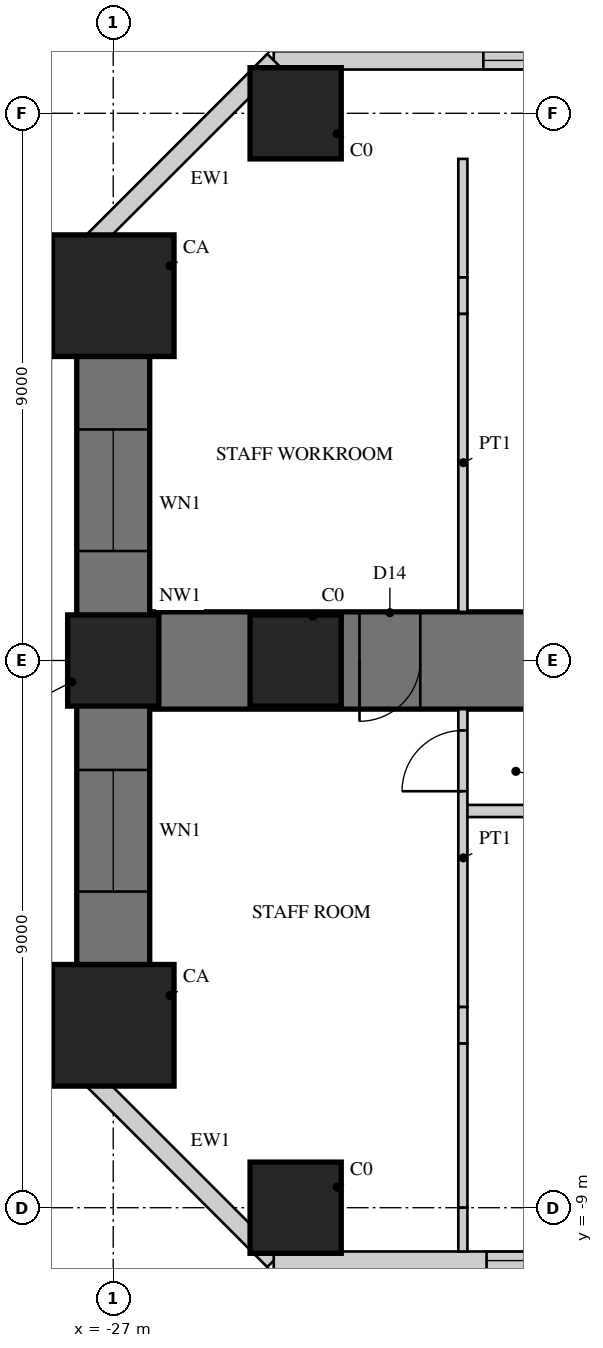
"""IFC4 building model, lengths in metres.
Left out: names, types, materials, properties, quantities, classifications, styles, units other than length and angle.
Written with IfcOpenShell. Run it as: python <this file> out.ifc"""

import sys

from ifc_helpers import new_model, si_unit, direction, frame, frame_2d, origin, origin_2d, place, context, subcontext, project, spatial, rectangle, hollow_rectangle, extrude, element, fill, save


model = new_model("IFC4")
c1 = context("Model", 3, precision=1e-05, world=origin(), true_north=direction((0.0, 1.0)))
c2 = subcontext(c1, "Body", "Model", "MODEL_VIEW")
j1 = project(units=[si_unit("LENGTHUNIT", "METRE"), si_unit("PLANEANGLEUNIT", "RADIAN")], contexts=[c1])
p1 = place(None, origin())
s1 = spatial("IfcSite", under=j1, at=p1, CompositionType="ELEMENT")
p2 = place(p1, origin())
s2 = spatial("IfcBuilding", under=s1, at=p2, CompositionType="ELEMENT")
p3 = place(p2, frame((0.0, 0.0, 5.0)))
s3 = spatial("IfcBuildingStorey", under=s2, at=p3, CompositionType="ELEMENT", Elevation=5.0)
p4 = place(p3, frame((-9.0, 0.0, 0.0), z_axis=(0.0, 0.0, 1.0), x_axis=(-1.0, 0.0, 0.0)))
e1 = element("IfcWall", 1, at=p4, inside=s3, PredefinedType="SHEAR", context=c2, shape_type="SweptSolid", body=[
    extrude(rectangle(XDim=18.0, YDim=1.6, at=frame_2d((9.0, 0.0))), origin(), (0.0, 0.0, 1.0), 4.5),
])
p5 = place(p4, frame((1.85, 0.0, 0.0)))
e2 = element("IfcOpeningElement", 2, at=p5, cuts=e1, PredefinedType="OPENING", context=c2, shape_type="SweptSolid", body=[
    extrude(rectangle(XDim=1.0, YDim=2.2, at=frame_2d((0.5, 1.1))), frame((0.0, 0.81, 0.0), z_axis=(0.0, -1.0, 0.0), x_axis=(1.0, 0.0, 0.0)), (0.0, 0.0, 1.0), 1.62),
])
p6 = place(p4, frame((7.2, 0.0, 0.0)))
e3 = element("IfcOpeningElement", 3, at=p6, cuts=e1, PredefinedType="OPENING", context=c2, shape_type="SweptSolid", body=[
    extrude(rectangle(XDim=1.0, YDim=2.2, at=frame_2d((0.5, 1.1))), frame((0.0, 0.81, 0.0), z_axis=(0.0, -1.0, 0.0), x_axis=(1.0, 0.0, 0.0)), (0.0, 0.0, 1.0), 1.62),
])
p7 = place(p4, frame((12.95, 0.0, 0.0)))
e4 = element("IfcOpeningElement", 4, at=p7, cuts=e1, PredefinedType="OPENING", context=c2, shape_type="SweptSolid", body=[
    extrude(rectangle(XDim=1.0, YDim=2.2, at=frame_2d((0.5, 1.1))), frame((0.0, 0.81, 0.0), z_axis=(0.0, -1.0, 0.0), x_axis=(1.0, 0.0, 0.0)), (0.0, 0.0, 1.0), 1.62),
])
p8 = place(p3, frame((-27.0, 6.0, 0.0), z_axis=(0.0, 0.0, 1.0), x_axis=(0.0, -1.0, 0.0)))
e5 = element("IfcWall", 5, at=p8, inside=s3, PredefinedType="SHEAR", context=c2, shape_type="SweptSolid", body=[
    extrude(rectangle(XDim=12.0, YDim=1.2, at=frame_2d((6.0, 0.0))), origin(), (0.0, 0.0, 1.0), 4.5),
])
p9 = place(p8, frame((2.2, 0.0, 0.9)))
e6 = element("IfcOpeningElement", 6, at=p9, cuts=e5, PredefinedType="OPENING", context=c2, shape_type="SweptSolid", body=[
    extrude(rectangle(XDim=2.0, YDim=1.8, at=frame_2d((1.0, 0.9))), frame((0.0, 0.61, 0.0), z_axis=(0.0, -1.0, 0.0), x_axis=(1.0, 0.0, 0.0)), (0.0, 0.0, 1.0), 1.22),
])
p10 = place(p8, frame((7.8, 0.0, 0.9)))
e7 = element("IfcOpeningElement", 7, at=p10, cuts=e5, PredefinedType="OPENING", context=c2, shape_type="SweptSolid", body=[
    extrude(rectangle(XDim=2.0, YDim=1.8, at=frame_2d((1.0, 0.9))), frame((0.0, 0.61, 0.0), z_axis=(0.0, -1.0, 0.0), x_axis=(1.0, 0.0, 0.0)), (0.0, 0.0, 1.0), 1.22),
])
for number, where, z_axis, x_axis in (
    (8, (-24.0, 9.0, 0.0), (0.0, 0.0, 1.0), (1.0, 0.0, 0.0)),
    (9, (-24.0, -9.0, 0.0), (0.0, 0.0, 1.0), (1.0, 0.0, 0.0)),
):
    element("IfcColumn", number, at=place(p3, frame(where, z_axis=z_axis, x_axis=x_axis)), inside=s3, PredefinedType="COLUMN", context=c2, shape_type="SweptSolid", body=[
        extrude(rectangle(XDim=1.5, YDim=1.5, at=origin_2d()), origin(), (0.0, 0.0, 1.0), 4.5),
    ])
p11 = place(p3, frame((-27.0, 6.0, 0.0), z_axis=(0.0, 0.0, 1.0), x_axis=(1.0, 0.0, 0.0)))
e10 = element("IfcColumn", 10, at=p11, inside=s3, PredefinedType="COLUMN", context=c2, shape_type="SweptSolid", body=[
    extrude(rectangle(XDim=2.0, YDim=2.0, at=origin_2d()), origin(), (0.0, 0.0, 1.0), 4.5),
])
p12 = place(p3, frame((-27.0, 0.0, 0.0), z_axis=(0.0, 0.0, 1.0), x_axis=(1.0, 0.0, 0.0)))
e11 = element("IfcColumn", 11, at=p12, inside=s3, PredefinedType="COLUMN", context=c2, shape_type="SweptSolid", body=[
    extrude(rectangle(XDim=1.5, YDim=1.5, at=origin_2d()), origin(), (0.0, 0.0, 1.0), 4.5),
])
p13 = place(p3, frame((-27.0, -6.0, 0.0), z_axis=(0.0, 0.0, 1.0), x_axis=(1.0, 0.0, 0.0)))
e12 = element("IfcColumn", 12, at=p13, inside=s3, PredefinedType="COLUMN", context=c2, shape_type="SweptSolid", body=[
    extrude(rectangle(XDim=2.0, YDim=2.0, at=origin_2d()), origin(), (0.0, 0.0, 1.0), 4.5),
])
p14 = place(p3, frame((-24.0, 0.0, 0.0), z_axis=(0.0, 0.0, 1.0), x_axis=(1.0, 0.0, 0.0)))
e13 = element("IfcColumn", 13, at=p14, inside=s3, PredefinedType="COLUMN", context=c2, shape_type="SweptSolid", body=[
    extrude(rectangle(XDim=1.5, YDim=1.5, at=origin_2d()), origin(), (0.0, 0.0, 1.0), 4.5),
])
p15 = place(p3, frame((-9.87, 9.87, 0.0), z_axis=(0.0, 0.0, 1.0), x_axis=(-1.0, 0.0, 0.0)))
e14 = element("IfcWall", 14, at=p15, inside=s3, PredefinedType="SOLIDWALL", context=c2, shape_type="SweptSolid", body=[
    extrude(rectangle(XDim=14.49, YDim=0.3, at=frame_2d((7.245, 0.0))), origin(), (0.0, 0.0, 1.0), 4.3),
])
p16 = place(p15, frame((2.65, 0.0, 0.0)))
e15 = element("IfcOpeningElement", 15, at=p16, cuts=e14, PredefinedType="OPENING", context=c2, shape_type="SweptSolid", body=[
    extrude(rectangle(XDim=1.0, YDim=2.4, at=frame_2d((0.5, 1.2))), frame((0.0, 0.16, 0.0), z_axis=(0.0, -1.0, 0.0), x_axis=(1.0, 0.0, 0.0)), (0.0, 0.0, 1.0), 0.32),
])
p17 = place(p15, frame((0.549, 0.0, 0.6)))
e16 = element("IfcOpeningElement", 16, at=p17, cuts=e14, PredefinedType="OPENING", context=c2, shape_type="SweptSolid", body=[
    extrude(rectangle(XDim=1.8, YDim=2.1, at=frame_2d((0.9, 1.05))), frame((0.0, 0.16, 0.0), z_axis=(0.0, -1.0, 0.0), x_axis=(1.0, 0.0, 0.0)), (0.0, 0.0, 1.0), 0.32),
])
p18 = place(p15, frame((9.243, 0.0, 0.6)))
e17 = element("IfcOpeningElement", 17, at=p18, cuts=e14, PredefinedType="OPENING", context=c2, shape_type="SweptSolid", body=[
    extrude(rectangle(XDim=1.8, YDim=2.1, at=frame_2d((0.9, 1.05))), frame((0.0, 0.16, 0.0), z_axis=(0.0, -1.0, 0.0), x_axis=(1.0, 0.0, 0.0)), (0.0, 0.0, 1.0), 0.32),
])
for number, where, z_axis, x_axis in (
    (18, (-24.36, 9.87, 0.0), (0.0, 0.0, 1.0), (-0.707, -0.707, 0.0)),
    (19, (-27.6, -6.63, 0.0), (0.0, 0.0, 1.0), (0.707, -0.707, 0.0)),
):
    element("IfcWall", number, at=place(p3, frame(where, z_axis=z_axis, x_axis=x_axis)), inside=s3, PredefinedType="SOLIDWALL", context=c2, shape_type="SweptSolid", body=[
        extrude(rectangle(XDim=4.582, YDim=0.3, at=frame_2d((2.291, 0.0))), origin(), (0.0, 0.0, 1.0), 4.3),
    ])
p19 = place(p3, frame((-24.36, -9.87, 0.0), z_axis=(0.0, 0.0, 1.0), x_axis=(1.0, 0.0, 0.0)))
e20 = element("IfcWall", 20, at=p19, inside=s3, PredefinedType="SOLIDWALL", context=c2, shape_type="SweptSolid", body=[
    extrude(rectangle(XDim=6.0, YDim=0.3, at=frame_2d((3.0, 0.0))), origin(), (0.0, 0.0, 1.0), 4.3),
])
p20 = place(p19, frame((3.5, 0.0, 0.9)))
e21 = element("IfcOpeningElement", 21, at=p20, cuts=e20, PredefinedType="OPENING", context=c2, shape_type="SweptSolid", body=[
    extrude(rectangle(XDim=2.0, YDim=1.8, at=frame_2d((1.0, 0.9))), frame((0.0, 0.16, 0.0), z_axis=(0.0, -1.0, 0.0), x_axis=(1.0, 0.0, 0.0)), (0.0, 0.0, 1.0), 0.32),
])
p21 = place(p3, frame((-9.65, -2.475, 0.0), z_axis=(0.0, 0.0, 1.0), x_axis=(-1.0, 0.0, 0.0)))
e22 = element("IfcWall", 22, at=p21, inside=s3, PredefinedType="SOLIDWALL", context=c2, shape_type="SweptSolid", body=[
    extrude(rectangle(XDim=11.6, YDim=0.2, at=frame_2d((5.8, 0.0))), origin(), (0.0, 0.0, 1.0), 4.3),
])
p22 = place(p21, frame((1.2, 0.0, 0.0)))
e23 = element("IfcOpeningElement", 23, at=p22, cuts=e22, PredefinedType="OPENING", context=c2, shape_type="SweptSolid", body=[
    extrude(rectangle(XDim=1.0, YDim=2.2, at=frame_2d((0.5, 1.1))), frame((0.0, 0.11, 0.0), z_axis=(0.0, -1.0, 0.0), x_axis=(1.0, 0.0, 0.0)), (0.0, 0.0, 1.0), 0.22),
])
p23 = place(p21, frame((6.55, 0.0, 0.0)))
e24 = element("IfcOpeningElement", 24, at=p23, cuts=e22, PredefinedType="OPENING", context=c2, shape_type="SweptSolid", body=[
    extrude(rectangle(XDim=1.0, YDim=2.2, at=frame_2d((0.5, 1.1))), frame((0.0, 0.11, 0.0), z_axis=(0.0, -1.0, 0.0), x_axis=(1.0, 0.0, 0.0)), (0.0, 0.0, 1.0), 0.22),
])
p24 = place(p3, frame((-21.25, 8.25, 0.0), z_axis=(0.0, 0.0, 1.0), x_axis=(0.0, -1.0, 0.0)))
e25 = element("IfcWall", 25, at=p24, inside=s3, PredefinedType="PARTITIONING", context=c2, shape_type="SweptSolid", body=[
    extrude(rectangle(XDim=1.95, YDim=0.15, at=frame_2d((0.975, 0.0))), origin(), (0.0, 0.0, 1.0), 3.35),
])
p25 = place(p3, frame((-21.25, 6.3, 0.0), z_axis=(0.0, 0.0, 1.0), x_axis=(0.0, -1.0, 0.0)))
e26 = element("IfcWall", 26, at=p25, inside=s3, PredefinedType="PARTITIONING", context=c2, shape_type="SweptSolid", body=[
    extrude(rectangle(XDim=0.6, YDim=0.15, at=frame_2d((0.3, 0.0))), origin(), (0.0, 0.0, 1.0), 4.3),
])
p26 = place(p3, frame((-21.25, 5.7, 0.0), z_axis=(0.0, 0.0, 1.0), x_axis=(0.0, -1.0, 0.0)))
e27 = element("IfcWall", 27, at=p26, inside=s3, PredefinedType="PARTITIONING", context=c2, shape_type="SweptSolid", body=[
    extrude(rectangle(XDim=4.9, YDim=0.15, at=frame_2d((2.45, 0.0))), origin(), (0.0, 0.0, 1.0), 3.35),
])
p27 = place(p3, frame((-21.25, -0.8, 0.0), z_axis=(0.0, 0.0, 1.0), x_axis=(0.0, -1.0, 0.0)))
e28 = element("IfcWall", 28, at=p27, inside=s3, PredefinedType="PARTITIONING", context=c2, shape_type="SweptSolid", body=[
    extrude(rectangle(XDim=4.9, YDim=0.15, at=frame_2d((2.45, 0.0))), origin(), (0.0, 0.0, 1.0), 3.35),
])
p28 = place(p27, frame((0.35, 0.0, 0.0)))
e29 = element("IfcOpeningElement", 29, at=p28, cuts=e28, PredefinedType="OPENING", context=c2, shape_type="SweptSolid", body=[
    extrude(rectangle(XDim=1.0, YDim=2.2, at=frame_2d((0.5, 1.1))), frame((0.0, 0.085, 0.0), z_axis=(0.0, -1.0, 0.0), x_axis=(1.0, 0.0, 0.0)), (0.0, 0.0, 1.0), 0.17),
])
p29 = place(p3, frame((-21.25, -5.7, 0.0), z_axis=(0.0, 0.0, 1.0), x_axis=(0.0, -1.0, 0.0)))
e30 = element("IfcWall", 30, at=p29, inside=s3, PredefinedType="PARTITIONING", context=c2, shape_type="SweptSolid", body=[
    extrude(rectangle(XDim=0.6, YDim=0.15, at=frame_2d((0.3, 0.0))), origin(), (0.0, 0.0, 1.0), 4.3),
])
p30 = place(p3, frame((-21.25, -6.3, 0.0), z_axis=(0.0, 0.0, 1.0), x_axis=(0.0, -1.0, 0.0)))
e31 = element("IfcWall", 31, at=p30, inside=s3, PredefinedType="PARTITIONING", context=c2, shape_type="SweptSolid", body=[
    extrude(rectangle(XDim=2.7, YDim=0.15, at=frame_2d((1.35, 0.0))), origin(), (0.0, 0.0, 1.0), 3.35),
])
p31 = place(p3, frame((-21.25, -9.0, 0.0), z_axis=(0.0, 0.0, 1.0), x_axis=(0.0, -1.0, 0.0)))
e32 = element("IfcWall", 32, at=p31, inside=s3, PredefinedType="PARTITIONING", context=c2, shape_type="SweptSolid", body=[
    extrude(rectangle(XDim=0.72, YDim=0.15, at=frame_2d((0.36, 0.0))), origin(), (0.0, 0.0, 1.0), 4.3),
])
p32 = place(p18, origin())
e33 = element("IfcWindow", 33, at=p32, inside=s3, PartitioningType="SINGLE_PANEL", PredefinedType="WINDOW", context=c2, shape_type="SweptSolid", body=[
    extrude(hollow_rectangle(XDim=1.8, YDim=2.1, WallThickness=0.06, at=frame_2d((0.9, 1.05))), frame((0.0, 0.03, 0.0), z_axis=(0.0, -1.0, 0.0), x_axis=(1.0, 0.0, 0.0)), (0.0, 0.0, 1.0), 0.06),
    extrude(rectangle(XDim=1.679, YDim=1.979, at=frame_2d((0.9, 1.05))), frame((0.0, 0.03, 0.0), z_axis=(0.0, -1.0, 0.0), x_axis=(1.0, 0.0, 0.0)), (0.0, 0.0, 1.0), 0.06),
])
fill(e17, e33)
p33 = place(p9, origin())
e34 = element("IfcWindow", 34, at=p33, inside=s3, PartitioningType="SINGLE_PANEL", PredefinedType="WINDOW", context=c2, shape_type="SweptSolid", body=[
    extrude(hollow_rectangle(XDim=2.0, YDim=1.8, WallThickness=0.06, at=frame_2d((1.0, 0.9))), frame((0.0, 0.03, 0.0), z_axis=(0.0, -1.0, 0.0), x_axis=(1.0, 0.0, 0.0)), (0.0, 0.0, 1.0), 0.06),
    extrude(rectangle(XDim=1.879, YDim=1.679, at=frame_2d((1.0, 0.9))), frame((0.0, 0.03, 0.0), z_axis=(0.0, -1.0, 0.0), x_axis=(1.0, 0.0, 0.0)), (0.0, 0.0, 1.0), 0.06),
])
fill(e6, e34)
p34 = place(p10, origin())
e35 = element("IfcWindow", 35, at=p34, inside=s3, PartitioningType="SINGLE_PANEL", PredefinedType="WINDOW", context=c2, shape_type="SweptSolid", body=[
    extrude(hollow_rectangle(XDim=2.0, YDim=1.8, WallThickness=0.06, at=frame_2d((1.0, 0.9))), frame((0.0, 0.03, 0.0), z_axis=(0.0, -1.0, 0.0), x_axis=(1.0, 0.0, 0.0)), (0.0, 0.0, 1.0), 0.06),
    extrude(rectangle(XDim=1.879, YDim=1.679, at=frame_2d((1.0, 0.9))), frame((0.0, 0.03, 0.0), z_axis=(0.0, -1.0, 0.0), x_axis=(1.0, 0.0, 0.0)), (0.0, 0.0, 1.0), 0.06),
])
fill(e7, e35)
p35 = place(p20, origin())
e36 = element("IfcWindow", 36, at=p35, inside=s3, PartitioningType="SINGLE_PANEL", PredefinedType="WINDOW", context=c2, shape_type="SweptSolid", body=[
    extrude(hollow_rectangle(XDim=2.0, YDim=1.8, WallThickness=0.06, at=frame_2d((1.0, 0.9))), frame((0.0, 0.03, 0.0), z_axis=(0.0, -1.0, 0.0), x_axis=(1.0, 0.0, 0.0)), (0.0, 0.0, 1.0), 0.06),
    extrude(rectangle(XDim=1.879, YDim=1.679, at=frame_2d((1.0, 0.9))), frame((0.0, 0.03, 0.0), z_axis=(0.0, -1.0, 0.0), x_axis=(1.0, 0.0, 0.0)), (0.0, 0.0, 1.0), 0.06),
])
fill(e21, e36)
p36 = place(p28, frame((1.0, 0.0, 0.0), z_axis=(0.0, 0.0, 1.0), x_axis=(-1.0, 0.0, 0.0)))
e37 = element("IfcDoor", 37, at=p36, inside=s3, OperationType="SINGLE_SWING_LEFT", PredefinedType="DOOR", context=c2, shape_type="SweptSolid", body=[
    extrude(rectangle(XDim=1.0, YDim=2.2, at=frame_2d((0.5, 1.1))), frame((0.0, 0.025, 0.0), z_axis=(0.0, -1.0, 0.0), x_axis=(1.0, 0.0, 0.0)), (0.0, 0.0, 1.0), 0.05),
])
fill(e29, e37)
p37 = place(p7, origin())
e38 = element("IfcDoor", 38, at=p37, inside=s3, OperationType="SINGLE_SWING_RIGHT", PredefinedType="DOOR", context=c2, shape_type="SweptSolid", body=[
    extrude(rectangle(XDim=1.0, YDim=2.2, at=frame_2d((0.5, 1.1))), frame((0.0, 0.025, 0.0), z_axis=(0.0, -1.0, 0.0), x_axis=(1.0, 0.0, 0.0)), (0.0, 0.0, 1.0), 0.05),
])
fill(e4, e38)
save(model, sys.argv[1])
